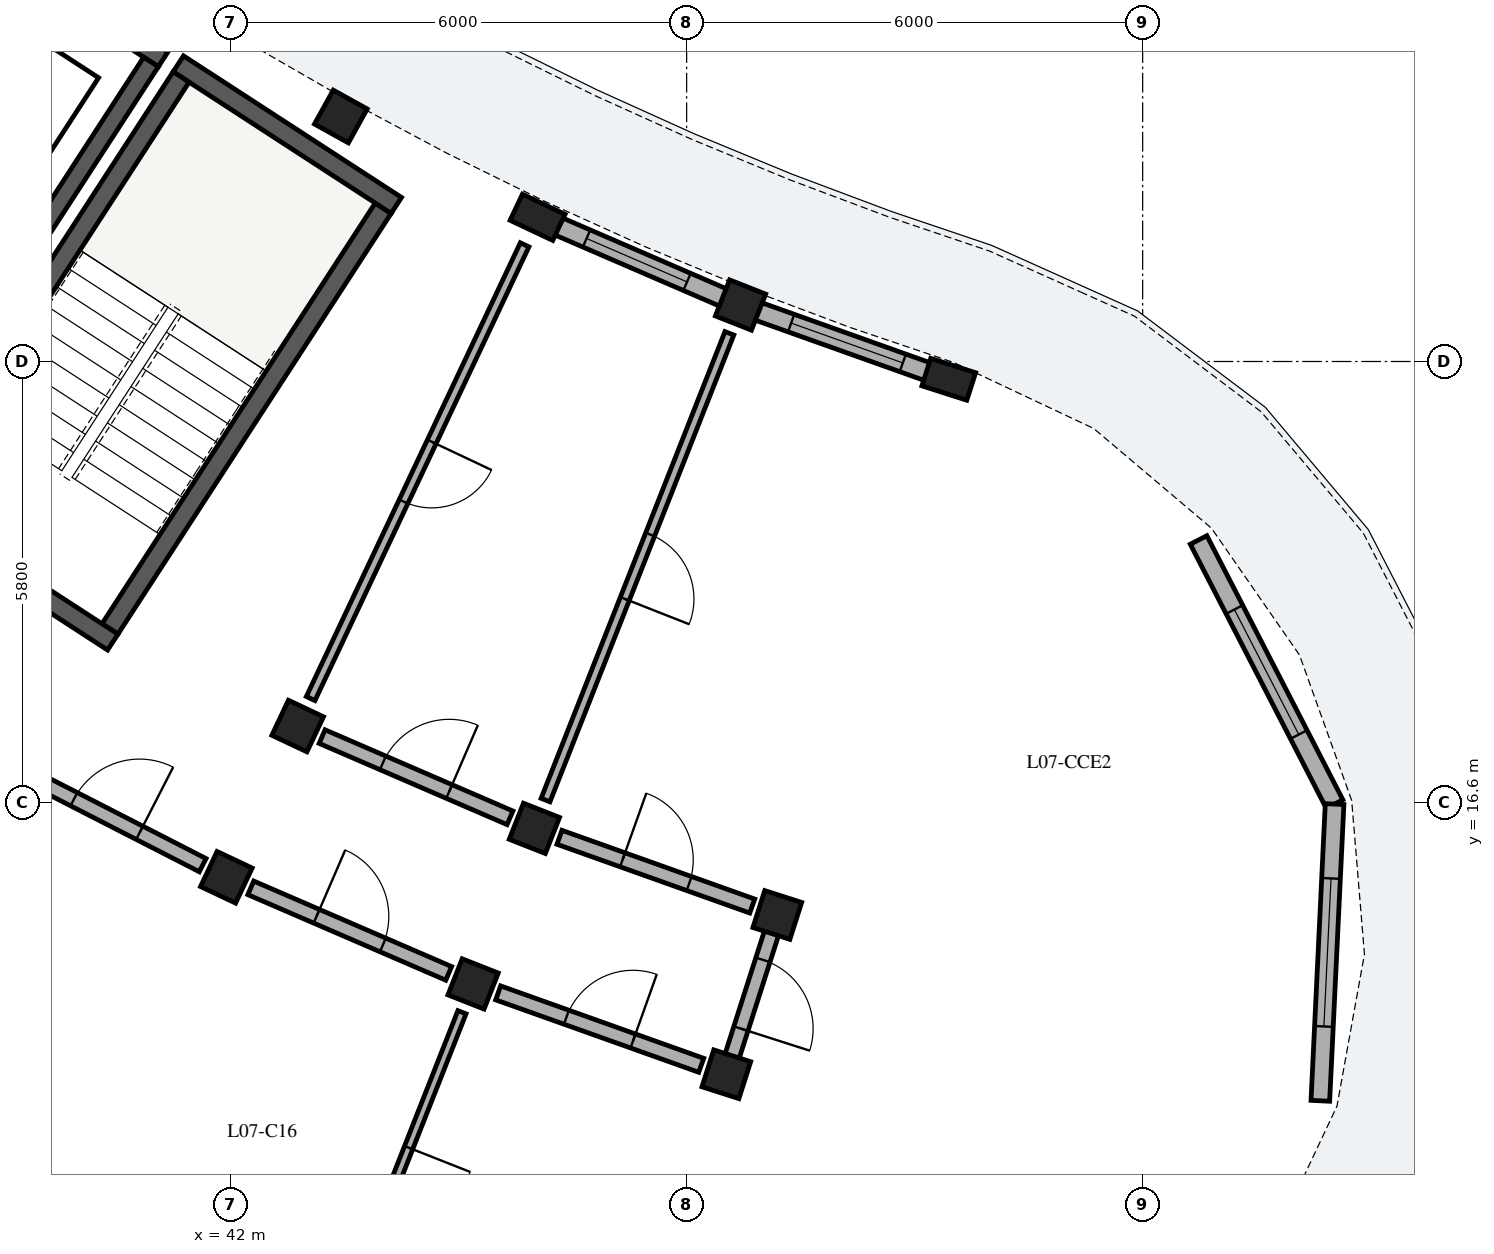
"""IFC4 building model, lengths in metres.
Left out: names, types, materials, properties, quantities, classifications, styles, units other than length and angle.
Written with IfcOpenShell. Run it as: python <this file> out.ifc"""

import sys

from ifc_helpers import new_model, si_unit, direction, frame, frame_2d, origin, origin_2d, place, context, subcontext, project, spatial, rectangle, extrude, element, fill, save


model = new_model("IFC4")
c1 = context("Model", 3, precision=1e-05, world=origin(), true_north=direction((0.0, 1.0)))
c2 = subcontext(c1, "Body", "Model", "MODEL_VIEW")
j1 = project(units=[si_unit("LENGTHUNIT", "METRE"), si_unit("PLANEANGLEUNIT", "RADIAN")], contexts=[c1])
p1 = place(None, origin())
s1 = spatial("IfcSite", under=j1, at=p1, CompositionType="ELEMENT")
p2 = place(p1, origin())
s2 = spatial("IfcBuilding", under=s1, at=p2, CompositionType="ELEMENT")
p3 = place(p2, frame((0.0, 0.0, 25.64)))
s3 = spatial("IfcBuildingStorey", under=s2, at=p3, CompositionType="ELEMENT", Elevation=25.64)
p4 = place(p3, frame((40.413, 18.882, 0.0), z_axis=(0.0, 0.0, 1.0), x_axis=(0.544629435258, 0.838676802022, 0.0)))
e1 = element("IfcWall", 1, at=p4, inside=s3, PredefinedType="SHEAR", context=c2, shape_type="SweptSolid", body=[
    extrude(rectangle(XDim=6.6, YDim=0.25, at=frame_2d((3.3, 0.0))), origin(), (0.0, 0.0, 1.0), 3.11),
])
p5 = place(p3, frame((44.18, 24.454, 0.0), z_axis=(0.0, 0.0, 1.0), x_axis=(-0.838699580527, 0.544594356953, 0.0)))
e2 = element("IfcWall", 2, at=p5, inside=s3, PredefinedType="SHEAR", context=c2, shape_type="SweptSolid", body=[
    extrude(rectangle(XDim=3.42, YDim=0.25, at=frame_2d((1.71, 0.0))), origin(), (0.0, 0.0, 1.0), 3.11),
])
p6 = place(p3, frame((40.449, 18.709, 0.0), z_axis=(0.0, 0.0, 1.0), x_axis=(-0.838678407117, 0.544626963559, 0.0)))
e3 = element("IfcWall", 3, at=p6, inside=s3, PredefinedType="SHEAR", context=c2, shape_type="SweptSolid", body=[
    extrude(rectangle(XDim=3.42, YDim=0.25, at=frame_2d((1.71, 0.0))), origin(), (0.0, 0.0, 1.0), 3.11),
])
p7 = place(p3, frame((37.754, 20.608, 0.0), z_axis=(0.0, 0.0, 1.0), x_axis=(0.544655453679, 0.838659905312, 0.0)))
e4 = element("IfcWall", 4, at=p7, inside=s3, PredefinedType="SHEAR", context=c2, shape_type="SweptSolid", body=[
    extrude(rectangle(XDim=6.6, YDim=0.25, at=frame_2d((3.3, 0.0))), origin(), (0.0, 0.0, 1.0), 3.11),
])
p8 = place(p7, frame((0.22, 0.0, 0.0)))
e5 = element("IfcOpeningElement", 5, at=p8, cuts=e4, PredefinedType="OPENING", context=c2, shape_type="SweptSolid", body=[
    extrude(rectangle(XDim=1.05, YDim=2.15, at=frame_2d((0.525, 1.075))), frame((0.0, 0.135, 0.0), z_axis=(0.0, -1.0, 0.0), x_axis=(1.0, 0.0, 0.0)), (0.0, 0.0, 1.0), 0.27),
])
p9 = place(p3, frame((41.112, 26.375, 0.0), z_axis=(0.0, 0.0, 1.0), x_axis=(-0.838638623546, 0.544688221919, 0.0)))
e6 = element("IfcWall", 6, at=p9, inside=s3, PredefinedType="SHEAR", context=c2, shape_type="SweptSolid", body=[
    extrude(rectangle(XDim=3.26, YDim=0.23, at=frame_2d((1.63, 0.0))), origin(), (0.0, 0.0, 1.0), 3.11),
])
p10 = place(p3, frame((39.482, 24.077, 0.0), z_axis=(0.0, 0.0, 1.0), x_axis=(0.544686387605, 0.838639814913, 0.0)))
e7 = element("IfcWall", 7, at=p10, inside=s3, PredefinedType="SHEAR", context=c2, shape_type="SweptSolid", body=[
    extrude(rectangle(XDim=2.7, YDim=0.23, at=frame_2d((1.35, 0.0))), origin(), (0.0, 0.0, 1.0), 3.11),
])
p11 = place(p3, frame((43.45, 25.623, 0.0), z_axis=(0.0, 0.0, 1.0), x_axis=(-0.484809620246, -0.874619707139, 0.0)))
e8 = element("IfcColumn", 8, at=p11, inside=s3, PredefinedType="COLUMN", context=c2, shape_type="SweptSolid", body=[
    extrude(rectangle(XDim=0.51, YDim=0.51, at=origin_2d()), origin(), (0.0, 0.0, 1.0), 3.11),
])
p12 = place(p3, frame((46.039, 24.297, 0.0), z_axis=(0.0, 0.0, 1.0), x_axis=(-0.426568739901, -0.904455145454, 0.0)))
e9 = element("IfcColumn", 9, at=p12, inside=s3, PredefinedType="PILASTER", context=c2, shape_type="SweptSolid", body=[
    extrude(rectangle(XDim=0.38, YDim=0.62, at=origin_2d()), origin(), (0.0, 0.0, 1.0), 3.11),
])
for number, where, z_axis, x_axis in (
    (10, (42.882, 17.604, 0.0), (0.0, 0.0, 1.0), (-0.427, -0.904, 0.0)),
    (11, (41.944, 15.614, 0.0), (0.0, 0.0, 1.0), (-0.427, -0.904, 0.0)),
    (12, (48.709, 23.143, 0.0), (0.0, 0.0, 1.0), (-0.367, -0.93, 0.0)),
    (13, (45.997, 16.258, 0.0), (0.0, 0.0, 1.0), (-0.367, -0.93, 0.0)),
    (14, (45.191, 14.211, 0.0), (0.0, 0.0, 1.0), (-0.367, -0.93, 0.0)),
):
    element("IfcColumn", number, at=place(p3, frame(where, z_axis=z_axis, x_axis=x_axis)), inside=s3, PredefinedType="COLUMN", context=c2, shape_type="SweptSolid", body=[
        extrude(rectangle(XDim=0.51, YDim=0.51, at=origin_2d()), origin(), (0.0, 0.0, 1.0), 3.11),
    ])
p13 = place(p3, frame((51.449, 22.166, 0.0), z_axis=(0.0, 0.0, 1.0), x_axis=(-0.304864299028, -0.952395799643, 0.0)))
e15 = element("IfcColumn", 15, at=p13, inside=s3, PredefinedType="PILASTER", context=c2, shape_type="SweptSolid", body=[
    extrude(rectangle(XDim=0.38, YDim=0.62, at=origin_2d()), origin(), (0.0, 0.0, 1.0), 3.11),
])
for number, where, z_axis, x_axis in (
    (16, (49.193, 15.118, 0.0), (0.0, 0.0, 1.0), (-0.305, -0.952, 0.0)),
    (17, (48.522, 13.023, 0.0), (0.0, 0.0, 1.0), (-0.305, -0.952, 0.0)),
):
    element("IfcColumn", number, at=place(p3, frame(where, z_axis=z_axis, x_axis=x_axis)), inside=s3, PredefinedType="COLUMN", context=c2, shape_type="SweptSolid", body=[
        extrude(rectangle(XDim=0.51, YDim=0.51, at=origin_2d()), origin(), (0.0, 0.0, 1.0), 3.11),
    ])
p14 = place(p3, frame((46.186, 24.233, 0.0), z_axis=(0.0, 0.0, 1.0), x_axis=(0.917939882583, -0.39671951296, 0.0)))
e18 = element("IfcWall", 18, at=p14, inside=s3, PredefinedType="SOLIDWALL", context=c2, shape_type="SweptSolid", body=[
    extrude(rectangle(XDim=2.524, YDim=0.245, at=frame_2d((1.262, 0.0))), origin(), (0.0, 0.0, 1.0), 2.355),
])
p15 = place(p14, frame((0.542, 0.0, 0.35)))
e19 = element("IfcOpeningElement", 19, at=p15, cuts=e18, PredefinedType="OPENING", context=c2, shape_type="SweptSolid", body=[
    extrude(rectangle(XDim=1.44, YDim=1.66, at=frame_2d((0.72, 0.83))), frame((0.0, 0.133, 0.0), z_axis=(0.0, -1.0, 0.0), x_axis=(1.0, 0.0, 0.0)), (0.0, 0.0, 1.0), 0.265),
])
p16 = place(p3, frame((48.921, 23.067, 0.0), z_axis=(0.0, 0.0, 1.0), x_axis=(0.941910313922, -0.335864497272, 0.0)))
e20 = element("IfcWall", 20, at=p16, inside=s3, PredefinedType="SOLIDWALL", context=c2, shape_type="SweptSolid", body=[
    extrude(rectangle(XDim=2.524, YDim=0.245, at=frame_2d((1.262, 0.0))), origin(), (0.0, 0.0, 1.0), 2.355),
])
p17 = place(p16, frame((0.482, 0.0, 0.55)))
e21 = element("IfcOpeningElement", 21, at=p17, cuts=e20, PredefinedType="OPENING", context=c2, shape_type="SweptSolid", body=[
    extrude(rectangle(XDim=1.56, YDim=1.51, at=frame_2d((0.78, 0.755))), frame((0.0, 0.133, 0.0), z_axis=(0.0, -1.0, 0.0), x_axis=(1.0, 0.0, 0.0)), (0.0, 0.0, 1.0), 0.265),
])
p18 = place(p3, frame((54.736, 20.052, 0.0), z_axis=(0.0, 0.0, 1.0), x_axis=(0.457901236663, -0.889003069434, 0.0)))
e22 = element("IfcWall", 22, at=p18, inside=s3, PredefinedType="SOLIDWALL", context=c2, shape_type="SweptSolid", body=[
    extrude(rectangle(XDim=3.908, YDim=0.245, at=frame_2d((1.954, 0.0))), origin(), (0.0, 0.0, 1.0), 2.355),
])
p19 = place(p18, frame((1.029, 0.0, 0.4)))
e23 = element("IfcOpeningElement", 23, at=p19, cuts=e22, PredefinedType="OPENING", context=c2, shape_type="SweptSolid", body=[
    extrude(rectangle(XDim=1.85, YDim=1.72, at=frame_2d((0.925, 0.86))), frame((0.0, 0.133, 0.0), z_axis=(0.0, -1.0, 0.0), x_axis=(1.0, 0.0, 0.0)), (0.0, 0.0, 1.0), 0.265),
])
p20 = place(p3, frame((56.525, 16.577, 0.0), z_axis=(0.0, 0.0, 1.0), x_axis=(-0.047974714619, -0.998848550461, 0.0)))
e24 = element("IfcWall", 24, at=p20, inside=s3, PredefinedType="SOLIDWALL", context=c2, shape_type="SweptSolid", body=[
    extrude(rectangle(XDim=3.908, YDim=0.245, at=frame_2d((1.954, 0.0))), origin(), (0.0, 0.0, 1.0), 2.355),
])
p21 = place(p20, frame((0.979, 0.0, 0.4)))
e25 = element("IfcOpeningElement", 25, at=p21, cuts=e24, PredefinedType="OPENING", context=c2, shape_type="SweptSolid", body=[
    extrude(rectangle(XDim=1.95, YDim=1.78, at=frame_2d((0.975, 0.89))), frame((0.0, 0.133, 0.0), z_axis=(0.0, -1.0, 0.0), x_axis=(1.0, 0.0, 0.0)), (0.0, 0.0, 1.0), 0.265),
])
p22 = place(p3, frame((39.107, 17.067, 0.0), z_axis=(0.0, 0.0, 1.0), x_axis=(0.890030590607, -0.45590080915, 0.0)))
e26 = element("IfcWall", 26, at=p22, inside=s3, PredefinedType="PARTITIONING", context=c2, shape_type="SweptSolid", body=[
    extrude(rectangle(XDim=2.837, YDim=0.195, at=frame_2d((1.418, 0.0))), origin(), (0.0, 0.0, 1.0), 2.37),
])
p23 = place(p22, frame((0.934, 0.0, 0.0)))
e27 = element("IfcOpeningElement", 27, at=p23, cuts=e26, PredefinedType="OPENING", context=c2, shape_type="SweptSolid", body=[
    extrude(rectangle(XDim=0.97, YDim=2.15, at=frame_2d((0.485, 1.075))), frame((0.0, 0.107, 0.0), z_axis=(0.0, -1.0, 0.0), x_axis=(1.0, 0.0, 0.0)), (0.0, 0.0, 1.0), 0.215),
])
p24 = place(p3, frame((45.868, 23.935, 0.0), z_axis=(0.0, 0.0, 1.0), x_axis=(-0.426573573579, -0.904452865728, 0.0)))
e28 = element("IfcWall", 28, at=p24, inside=s3, PredefinedType="PARTITIONING", context=c2, shape_type="SweptSolid", body=[
    extrude(rectangle(XDim=6.6, YDim=0.125, at=frame_2d((3.3, 0.0))), origin(), (0.0, 0.0, 1.0), 2.37),
])
p25 = place(p24, frame((2.865, 0.0, 0.0)))
e29 = element("IfcOpeningElement", 29, at=p25, cuts=e28, PredefinedType="OPENING", context=c2, shape_type="SweptSolid", body=[
    extrude(rectangle(XDim=0.87, YDim=2.08, at=frame_2d((0.435, 1.04))), frame((0.0, 0.073, 0.0), z_axis=(0.0, -1.0, 0.0), x_axis=(1.0, 0.0, 0.0)), (0.0, 0.0, 1.0), 0.145),
])
p26 = place(p3, frame((42.265, 15.475, 0.0), z_axis=(0.0, 0.0, 1.0), x_axis=(0.917943439406, -0.396711282991, 0.0)))
e30 = element("IfcWall", 30, at=p26, inside=s3, PredefinedType="PARTITIONING", context=c2, shape_type="SweptSolid", body=[
    extrude(rectangle(XDim=2.837, YDim=0.195, at=frame_2d((1.418, 0.0))), origin(), (0.0, 0.0, 1.0), 2.37),
])
p27 = place(p26, frame((0.944, 0.0, 0.0)))
e31 = element("IfcOpeningElement", 31, at=p27, cuts=e30, PredefinedType="OPENING", context=c2, shape_type="SweptSolid", body=[
    extrude(rectangle(XDim=0.95, YDim=2.13, at=frame_2d((0.475, 1.065))), frame((0.0, 0.107, 0.0), z_axis=(0.0, -1.0, 0.0), x_axis=(1.0, 0.0, 0.0)), (0.0, 0.0, 1.0), 0.215),
])
p28 = place(p3, frame((43.204, 17.465, 0.0), z_axis=(0.0, 0.0, 1.0), x_axis=(0.91793557165, -0.39672948756, 0.0)))
e32 = element("IfcWall", 32, at=p28, inside=s3, PredefinedType="PARTITIONING", context=c2, shape_type="SweptSolid", body=[
    extrude(rectangle(XDim=2.693, YDim=0.195, at=frame_2d((1.346, 0.0))), origin(), (0.0, 0.0, 1.0), 2.37),
])
p29 = place(p28, frame((0.872, 0.0, 0.0)))
e33 = element("IfcOpeningElement", 33, at=p29, cuts=e32, PredefinedType="OPENING", context=c2, shape_type="SweptSolid", body=[
    extrude(rectangle(XDim=0.95, YDim=2.13, at=frame_2d((0.475, 1.065))), frame((0.0, 0.107, 0.0), z_axis=(0.0, -1.0, 0.0), x_axis=(1.0, 0.0, 0.0)), (0.0, 0.0, 1.0), 0.215),
])
p30 = place(p3, frame((45.044, 13.839, 0.0), z_axis=(0.0, 0.0, 1.0), x_axis=(-0.366468650514, -0.930430399434, 0.0)))
e34 = element("IfcWall", 34, at=p30, inside=s3, PredefinedType="PARTITIONING", context=c2, shape_type="SweptSolid", body=[
    extrude(rectangle(XDim=4.7, YDim=0.115, at=frame_2d((2.35, 0.0))), origin(), (0.0, 0.0, 1.0), 2.37),
])
p31 = place(p30, frame((1.915, 0.0, 0.0)))
e35 = element("IfcOpeningElement", 35, at=p31, cuts=e34, PredefinedType="OPENING", context=c2, shape_type="SweptSolid", body=[
    extrude(rectangle(XDim=0.87, YDim=2.08, at=frame_2d((0.435, 1.04))), frame((0.0, 0.067, 0.0), z_axis=(0.0, -1.0, 0.0), x_axis=(1.0, 0.0, 0.0)), (0.0, 0.0, 1.0), 0.135),
])
p32 = place(p3, frame((48.562, 22.771, 0.0), z_axis=(0.0, 0.0, 1.0), x_axis=(-0.366512873936, -0.930412979939, 0.0)))
e36 = element("IfcWall", 36, at=p32, inside=s3, PredefinedType="PARTITIONING", context=c2, shape_type="SweptSolid", body=[
    extrude(rectangle(XDim=6.6, YDim=0.125, at=frame_2d((3.3, 0.0))), origin(), (0.0, 0.0, 1.0), 2.37),
])
p33 = place(p32, frame((2.845, 0.0, 0.0)))
e37 = element("IfcOpeningElement", 37, at=p33, cuts=e36, PredefinedType="OPENING", context=c2, shape_type="SweptSolid", body=[
    extrude(rectangle(XDim=0.91, YDim=2.1, at=frame_2d((0.455, 1.05))), frame((0.0, 0.073, 0.0), z_axis=(0.0, -1.0, 0.0), x_axis=(1.0, 0.0, 0.0)), (0.0, 0.0, 1.0), 0.145),
])
p34 = place(p3, frame((45.52, 14.093, 0.0), z_axis=(0.0, 0.0, 1.0), x_axis=(0.941930628611, -0.335807520589, 0.0)))
e38 = element("IfcWall", 38, at=p34, inside=s3, PredefinedType="PARTITIONING", context=c2, shape_type="SweptSolid", body=[
    extrude(rectangle(XDim=2.837, YDim=0.195, at=frame_2d((1.418, 0.0))), origin(), (0.0, 0.0, 1.0), 2.37),
])
p35 = place(p34, frame((0.954, 0.0, 0.0)))
e39 = element("IfcOpeningElement", 39, at=p35, cuts=e38, PredefinedType="OPENING", context=c2, shape_type="SweptSolid", body=[
    extrude(rectangle(XDim=0.93, YDim=2.12, at=frame_2d((0.465, 1.06))), frame((0.0, 0.107, 0.0), z_axis=(0.0, -1.0, 0.0), x_axis=(1.0, 0.0, 0.0)), (0.0, 0.0, 1.0), 0.215),
])
p36 = place(p3, frame((46.327, 16.14, 0.0), z_axis=(0.0, 0.0, 1.0), x_axis=(0.941895652647, -0.335905611036, 0.0)))
e40 = element("IfcWall", 40, at=p36, inside=s3, PredefinedType="PARTITIONING", context=c2, shape_type="SweptSolid", body=[
    extrude(rectangle(XDim=2.693, YDim=0.195, at=frame_2d((1.346, 0.0))), origin(), (0.0, 0.0, 1.0), 2.37),
])
p37 = place(p36, frame((0.882, 0.0, 0.0)))
e41 = element("IfcOpeningElement", 41, at=p37, cuts=e40, PredefinedType="OPENING", context=c2, shape_type="SweptSolid", body=[
    extrude(rectangle(XDim=0.93, YDim=2.12, at=frame_2d((0.465, 1.06))), frame((0.0, 0.107, 0.0), z_axis=(0.0, -1.0, 0.0), x_axis=(1.0, 0.0, 0.0)), (0.0, 0.0, 1.0), 0.215),
])
p38 = place(p3, frame((49.177, 15.071, 0.0), z_axis=(0.0, 0.0, 1.0), x_axis=(-0.304834784779, -0.952405246725, 0.0)))
e42 = element("IfcWall", 42, at=p38, inside=s3, PredefinedType="PARTITIONING", context=c2, shape_type="SweptSolid", body=[
    extrude(rectangle(XDim=2.1, YDim=0.195, at=frame_2d((1.05, 0.0))), origin(), (0.0, 0.0, 1.0), 2.37),
])
p39 = place(p38, frame((0.57, 0.0, 0.0)))
e43 = element("IfcOpeningElement", 43, at=p39, cuts=e42, PredefinedType="OPENING", context=c2, shape_type="SweptSolid", body=[
    extrude(rectangle(XDim=0.95, YDim=2.13, at=frame_2d((0.475, 1.065))), frame((0.0, 0.107, 0.0), z_axis=(0.0, -1.0, 0.0), x_axis=(1.0, 0.0, 0.0)), (0.0, 0.0, 1.0), 0.215),
])
p40 = place(p15, origin())
e44 = element("IfcWindow", 44, at=p40, inside=s3, PartitioningType="SINGLE_PANEL", PredefinedType="WINDOW", context=c2, shape_type="SweptSolid", body=[
    extrude(rectangle(XDim=1.44, YDim=1.66, at=frame_2d((0.72, 0.83))), frame((0.0, 0.03, 0.0), z_axis=(0.0, -1.0, 0.0), x_axis=(1.0, 0.0, 0.0)), (0.0, 0.0, 1.0), 0.06),
])
fill(e19, e44)
p41 = place(p17, origin())
e45 = element("IfcWindow", 45, at=p41, inside=s3, PartitioningType="SINGLE_PANEL", PredefinedType="WINDOW", context=c2, shape_type="SweptSolid", body=[
    extrude(rectangle(XDim=1.56, YDim=1.51, at=frame_2d((0.78, 0.755))), frame((0.0, 0.03, 0.0), z_axis=(0.0, -1.0, 0.0), x_axis=(1.0, 0.0, 0.0)), (0.0, 0.0, 1.0), 0.06),
])
fill(e21, e45)
p42 = place(p19, origin())
e46 = element("IfcWindow", 46, at=p42, inside=s3, PartitioningType="SINGLE_PANEL", PredefinedType="WINDOW", context=c2, shape_type="SweptSolid", body=[
    extrude(rectangle(XDim=1.85, YDim=1.72, at=frame_2d((0.925, 0.86))), frame((0.0, 0.03, 0.0), z_axis=(0.0, -1.0, 0.0), x_axis=(1.0, 0.0, 0.0)), (0.0, 0.0, 1.0), 0.06),
])
fill(e23, e46)
p43 = place(p21, origin())
e47 = element("IfcWindow", 47, at=p43, inside=s3, PartitioningType="SINGLE_PANEL", PredefinedType="WINDOW", context=c2, shape_type="SweptSolid", body=[
    extrude(rectangle(XDim=1.95, YDim=1.78, at=frame_2d((0.975, 0.89))), frame((0.0, 0.03, 0.0), z_axis=(0.0, -1.0, 0.0), x_axis=(1.0, 0.0, 0.0)), (0.0, 0.0, 1.0), 0.06),
])
fill(e25, e47)
p44 = place(p23, origin())
e48 = element("IfcDoor", 48, at=p44, inside=s3, OperationType="SINGLE_SWING_RIGHT", PredefinedType="DOOR", context=c2, shape_type="SweptSolid", body=[
    extrude(rectangle(XDim=0.97, YDim=2.15, at=frame_2d((0.485, 1.075))), frame((0.0, 0.025, 0.0), z_axis=(0.0, -1.0, 0.0), x_axis=(1.0, 0.0, 0.0)), (0.0, 0.0, 1.0), 0.05),
])
fill(e27, e48)
p45 = place(p25, origin())
e49 = element("IfcDoor", 49, at=p45, inside=s3, OperationType="SINGLE_SWING_LEFT", PredefinedType="DOOR", context=c2, shape_type="SweptSolid", body=[
    extrude(rectangle(XDim=0.87, YDim=2.08, at=frame_2d((0.435, 1.04))), frame((0.0, 0.025, 0.0), z_axis=(0.0, -1.0, 0.0), x_axis=(1.0, 0.0, 0.0)), (0.0, 0.0, 1.0), 0.05),
])
fill(e29, e49)
p46 = place(p27, origin())
e50 = element("IfcDoor", 50, at=p46, inside=s3, OperationType="SINGLE_SWING_LEFT", PredefinedType="DOOR", context=c2, shape_type="SweptSolid", body=[
    extrude(rectangle(XDim=0.95, YDim=2.13, at=frame_2d((0.475, 1.065))), frame((0.0, 0.025, 0.0), z_axis=(0.0, -1.0, 0.0), x_axis=(1.0, 0.0, 0.0)), (0.0, 0.0, 1.0), 0.05),
])
fill(e31, e50)
p47 = place(p29, origin())
e51 = element("IfcDoor", 51, at=p47, inside=s3, OperationType="SINGLE_SWING_RIGHT", PredefinedType="DOOR", context=c2, shape_type="SweptSolid", body=[
    extrude(rectangle(XDim=0.95, YDim=2.13, at=frame_2d((0.475, 1.065))), frame((0.0, 0.025, 0.0), z_axis=(0.0, -1.0, 0.0), x_axis=(1.0, 0.0, 0.0)), (0.0, 0.0, 1.0), 0.05),
])
fill(e33, e51)
p48 = place(p31, origin())
e52 = element("IfcDoor", 52, at=p48, inside=s3, OperationType="SINGLE_SWING_LEFT", PredefinedType="DOOR", context=c2, shape_type="SweptSolid", body=[
    extrude(rectangle(XDim=0.87, YDim=2.08, at=frame_2d((0.435, 1.04))), frame((0.0, 0.025, 0.0), z_axis=(0.0, -1.0, 0.0), x_axis=(1.0, 0.0, 0.0)), (0.0, 0.0, 1.0), 0.05),
])
fill(e35, e52)
p49 = place(p33, origin())
e53 = element("IfcDoor", 53, at=p49, inside=s3, OperationType="SINGLE_SWING_RIGHT", PredefinedType="DOOR", context=c2, shape_type="SweptSolid", body=[
    extrude(rectangle(XDim=0.91, YDim=2.1, at=frame_2d((0.455, 1.05))), frame((0.0, 0.025, 0.0), z_axis=(0.0, -1.0, 0.0), x_axis=(1.0, 0.0, 0.0)), (0.0, 0.0, 1.0), 0.05),
])
fill(e37, e53)
p50 = place(p35, origin())
e54 = element("IfcDoor", 54, at=p50, inside=s3, OperationType="SINGLE_SWING_RIGHT", PredefinedType="DOOR", context=c2, shape_type="SweptSolid", body=[
    extrude(rectangle(XDim=0.93, YDim=2.12, at=frame_2d((0.465, 1.06))), frame((0.0, 0.025, 0.0), z_axis=(0.0, -1.0, 0.0), x_axis=(1.0, 0.0, 0.0)), (0.0, 0.0, 1.0), 0.05),
])
fill(e39, e54)
p51 = place(p37, origin())
e55 = element("IfcDoor", 55, at=p51, inside=s3, OperationType="SINGLE_SWING_LEFT", PredefinedType="DOOR", context=c2, shape_type="SweptSolid", body=[
    extrude(rectangle(XDim=0.93, YDim=2.12, at=frame_2d((0.465, 1.06))), frame((0.0, 0.025, 0.0), z_axis=(0.0, -1.0, 0.0), x_axis=(1.0, 0.0, 0.0)), (0.0, 0.0, 1.0), 0.05),
])
fill(e41, e55)
p52 = place(p39, origin())
e56 = element("IfcDoor", 56, at=p52, inside=s3, OperationType="SINGLE_SWING_RIGHT", PredefinedType="DOOR", context=c2, shape_type="SweptSolid", body=[
    extrude(rectangle(XDim=0.95, YDim=2.13, at=frame_2d((0.475, 1.065))), frame((0.0, 0.025, 0.0), z_axis=(0.0, -1.0, 0.0), x_axis=(1.0, 0.0, 0.0)), (0.0, 0.0, 1.0), 0.05),
])
fill(e43, e56)
save(model, sys.argv[1])
